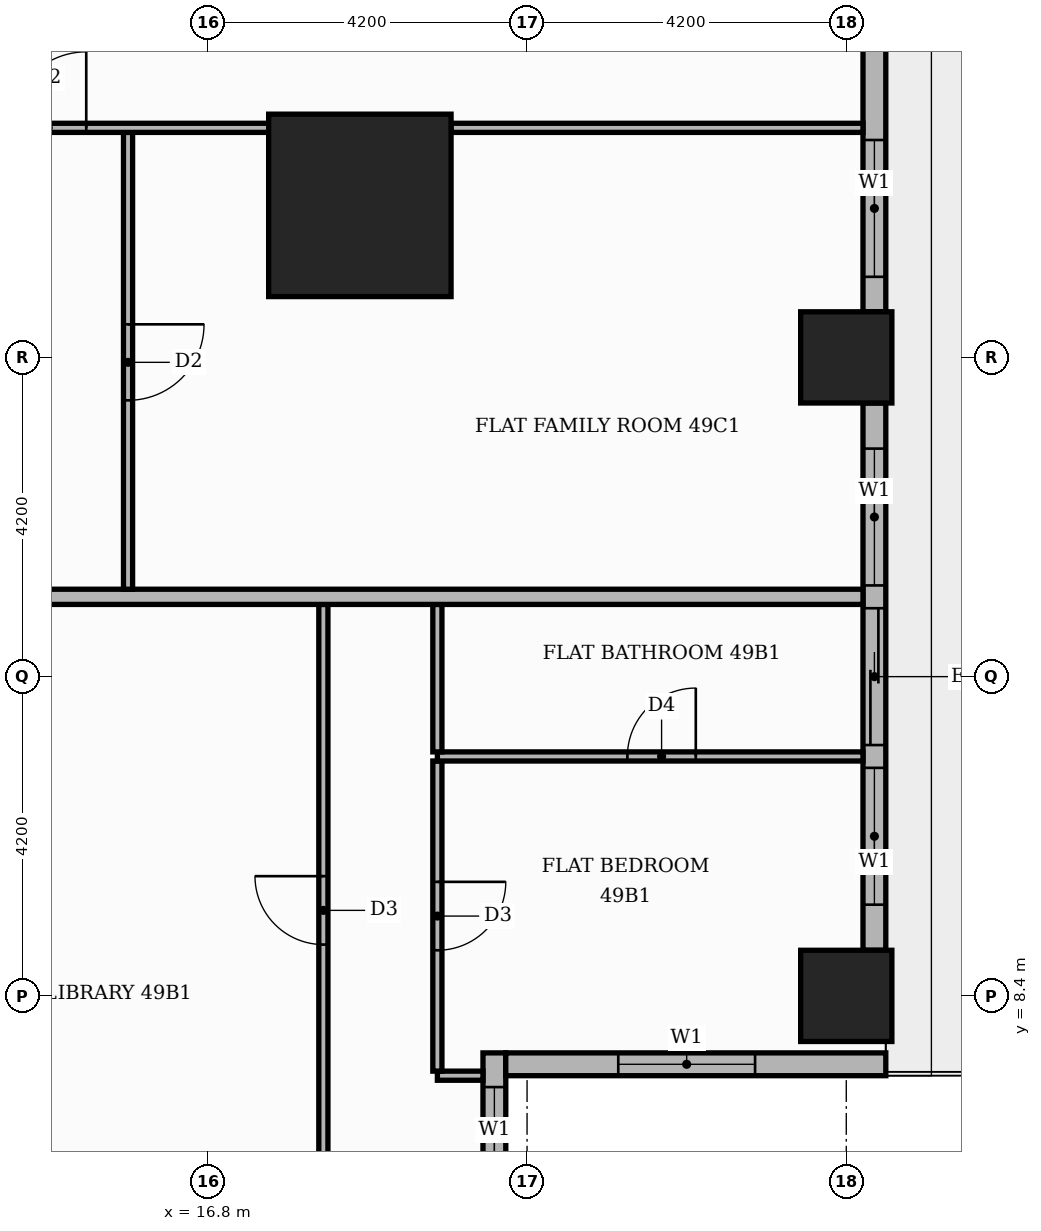
"""IFC4 building model, lengths in metres.
Left out: names, types, materials, properties, quantities, classifications, styles, units other than length and angle.
Written with IfcOpenShell. Run it as: python <this file> out.ifc"""

import sys

from ifc_helpers import new_model, si_unit, direction, frame, frame_2d, origin, origin_2d, place, context, subcontext, project, spatial, rectangle, extrude, element, fill, save


model = new_model("IFC4")
c1 = context("Model", 3, precision=1e-05, world=origin(), true_north=direction((0.0, 1.0)))
c2 = subcontext(c1, "Body", "Model", "MODEL_VIEW")
j1 = project(units=[si_unit("LENGTHUNIT", "METRE"), si_unit("PLANEANGLEUNIT", "RADIAN")], contexts=[c1])
p1 = place(None, origin())
s1 = spatial("IfcSite", under=j1, at=p1, CompositionType="ELEMENT")
p2 = place(p1, origin())
s2 = spatial("IfcBuilding", under=s1, at=p2, CompositionType="ELEMENT")
p3 = place(p2, frame((0.0, 0.0, 207.9)))
s3 = spatial("IfcBuildingStorey", under=s2, at=p3, CompositionType="ELEMENT", Elevation=207.9)
p4 = place(p3, frame((18.8, 18.8, 0.0), z_axis=(0.0, 0.0, 1.0), x_axis=(1.0, 0.0, 0.0)))
e1 = element("IfcColumn", 1, at=p4, inside=s3, PredefinedType="COLUMN", context=c2, shape_type="SweptSolid", body=[
    extrude(rectangle(XDim=2.4, YDim=2.4, at=origin_2d()), origin(), (0.0, 0.0, 1.0), 3.9),
])
for number, where, z_axis, x_axis in (
    (2, (25.2, 8.4, 0.0), (0.0, 0.0, 1.0), (1.0, 0.0, 0.0)),
    (3, (25.2, 16.8, 0.0), (0.0, 0.0, 1.0), (1.0, 0.0, 0.0)),
):
    element("IfcColumn", number, at=place(p3, frame(where, z_axis=z_axis, x_axis=x_axis)), inside=s3, PredefinedType="COLUMN", context=c2, shape_type="SweptSolid", body=[
        extrude(rectangle(XDim=1.2, YDim=1.2, at=origin_2d()), origin(), (0.0, 0.0, 1.0), 3.9),
    ])
p5 = place(p3, frame((20.57, -7.35, 0.0), z_axis=(0.0, 0.0, 1.0), x_axis=(0.0, 1.0, 0.0)))
e4 = element("IfcWall", 4, at=p5, inside=s3, PredefinedType="STANDARD", context=c2, shape_type="SweptSolid", body=[
    extrude(rectangle(XDim=15.0, YDim=0.3, at=frame_2d((7.5, 0.0))), origin(), (0.0, 0.0, 1.0), 3.48),
])
p6 = place(p5, frame((0.15, 0.0, 0.9)))
e5 = element("IfcOpeningElement", 5, at=p6, cuts=e4, PredefinedType="OPENING", context=c2, shape_type="SweptSolid", body=[
    extrude(rectangle(XDim=6.0, YDim=2.1, at=frame_2d((3.0, 1.05))), frame((0.0, 0.16, 0.0), z_axis=(0.0, -1.0, 0.0), x_axis=(1.0, 0.0, 0.0)), (0.0, 0.0, 1.0), 0.32),
])
p7 = place(p5, frame((6.45, 0.0, 0.9)))
e6 = element("IfcOpeningElement", 6, at=p7, cuts=e4, PredefinedType="OPENING", context=c2, shape_type="SweptSolid", body=[
    extrude(rectangle(XDim=6.0, YDim=2.1, at=frame_2d((3.0, 1.05))), frame((0.0, 0.16, 0.0), z_axis=(0.0, -1.0, 0.0), x_axis=(1.0, 0.0, 0.0)), (0.0, 0.0, 1.0), 0.32),
])
p8 = place(p5, frame((12.75, 0.0, 0.9)))
e7 = element("IfcOpeningElement", 7, at=p8, cuts=e4, PredefinedType="OPENING", context=c2, shape_type="SweptSolid", body=[
    extrude(rectangle(XDim=1.8, YDim=2.1, at=frame_2d((0.9, 1.05))), frame((0.0, 0.16, 0.0), z_axis=(0.0, -1.0, 0.0), x_axis=(1.0, 0.0, 0.0)), (0.0, 0.0, 1.0), 0.32),
])
p9 = place(p3, frame((20.72, 7.5, 0.0), z_axis=(0.0, 0.0, 1.0), x_axis=(1.0, 0.0, 0.0)))
e8 = element("IfcWall", 8, at=p9, inside=s3, PredefinedType="STANDARD", context=c2, shape_type="SweptSolid", body=[
    extrude(rectangle(XDim=5.0, YDim=0.3, at=frame_2d((2.5, 0.0))), origin(), (0.0, 0.0, 1.0), 3.48),
])
p10 = place(p9, frame((1.48, 0.0, 0.9)))
e9 = element("IfcOpeningElement", 9, at=p10, cuts=e8, PredefinedType="OPENING", context=c2, shape_type="SweptSolid", body=[
    extrude(rectangle(XDim=1.8, YDim=2.1, at=frame_2d((0.9, 1.05))), frame((0.0, 0.16, 0.0), z_axis=(0.0, -1.0, 0.0), x_axis=(1.0, 0.0, 0.0)), (0.0, 0.0, 1.0), 0.32),
])
p11 = place(p3, frame((25.57, 9.0, 0.0), z_axis=(0.0, 0.0, 1.0), x_axis=(0.0, 1.0, 0.0)))
e10 = element("IfcWall", 10, at=p11, inside=s3, PredefinedType="STANDARD", context=c2, shape_type="SweptSolid", body=[
    extrude(rectangle(XDim=7.2, YDim=0.3, at=frame_2d((3.6, 0.0))), origin(), (0.0, 0.0, 1.0), 3.48),
])
p12 = place(p11, frame((0.6, 0.0, 0.9)))
e11 = element("IfcOpeningElement", 11, at=p12, cuts=e10, PredefinedType="OPENING", context=c2, shape_type="SweptSolid", body=[
    extrude(rectangle(XDim=1.8, YDim=2.1, at=frame_2d((0.9, 1.05))), frame((0.0, 0.16, 0.0), z_axis=(0.0, -1.0, 0.0), x_axis=(1.0, 0.0, 0.0)), (0.0, 0.0, 1.0), 0.32),
])
p13 = place(p11, frame((2.7, 0.0, 0.0)))
e12 = element("IfcOpeningElement", 12, at=p13, cuts=e10, PredefinedType="OPENING", context=c2, shape_type="SweptSolid", body=[
    extrude(rectangle(XDim=1.8, YDim=2.4, at=frame_2d((0.9, 1.2))), frame((0.0, 0.16, 0.0), z_axis=(0.0, -1.0, 0.0), x_axis=(1.0, 0.0, 0.0)), (0.0, 0.0, 1.0), 0.32),
])
p14 = place(p11, frame((4.8, 0.0, 0.9)))
e13 = element("IfcOpeningElement", 13, at=p14, cuts=e10, PredefinedType="OPENING", context=c2, shape_type="SweptSolid", body=[
    extrude(rectangle(XDim=1.8, YDim=2.1, at=frame_2d((0.9, 1.05))), frame((0.0, 0.16, 0.0), z_axis=(0.0, -1.0, 0.0), x_axis=(1.0, 0.0, 0.0)), (0.0, 0.0, 1.0), 0.32),
])
p15 = place(p3, frame((25.57, 17.4, 0.0), z_axis=(0.0, 0.0, 1.0), x_axis=(0.0, 1.0, 0.0)))
e14 = element("IfcWall", 14, at=p15, inside=s3, PredefinedType="STANDARD", context=c2, shape_type="SweptSolid", body=[
    extrude(rectangle(XDim=3.82, YDim=0.3, at=frame_2d((1.91, 0.0))), origin(), (0.0, 0.0, 1.0), 3.48),
])
p16 = place(p15, frame((0.46, 0.0, 0.9)))
e15 = element("IfcOpeningElement", 15, at=p16, cuts=e14, PredefinedType="OPENING", context=c2, shape_type="SweptSolid", body=[
    extrude(rectangle(XDim=1.8, YDim=2.1, at=frame_2d((0.9, 1.05))), frame((0.0, 0.16, 0.0), z_axis=(0.0, -1.0, 0.0), x_axis=(1.0, 0.0, 0.0)), (0.0, 0.0, 1.0), 0.32),
])
p17 = place(p3, frame((18.32, 5.46, 0.0), z_axis=(0.0, 0.0, 1.0), x_axis=(0.0, 1.0, 0.0)))
e16 = element("IfcWall", 16, at=p17, inside=s3, PredefinedType="PARTITIONING", context=c2, shape_type="SweptSolid", body=[
    extrude(rectangle(XDim=8.09, YDim=0.12, at=frame_2d((4.045, 0.0))), origin(), (0.0, 0.0, 1.0), 3.48),
])
p18 = place(p17, frame((3.615, 0.0, 0.0)))
e17 = element("IfcOpeningElement", 17, at=p18, cuts=e16, PredefinedType="OPENING", context=c2, shape_type="SweptSolid", body=[
    extrude(rectangle(XDim=0.9, YDim=2.1, at=frame_2d((0.45, 1.05))), frame((0.0, 0.07, 0.0), z_axis=(0.0, -1.0, 0.0), x_axis=(1.0, 0.0, 0.0)), (0.0, 0.0, 1.0), 0.14),
])
p19 = place(p3, frame((19.82, 7.35, 0.0), z_axis=(0.0, 0.0, 1.0), x_axis=(1.0, 0.0, 0.0)))
e18 = element("IfcWall", 18, at=p19, inside=s3, PredefinedType="PARTITIONING", context=c2, shape_type="SweptSolid", body=[
    extrude(rectangle(XDim=0.6, YDim=0.12, at=frame_2d((0.3, 0.0))), origin(), (0.0, 0.0, 1.0), 3.48),
])
p20 = place(p3, frame((19.82, 7.41, 0.0), z_axis=(0.0, 0.0, 1.0), x_axis=(0.0, 1.0, 0.0)))
e19 = element("IfcWall", 19, at=p20, inside=s3, PredefinedType="PARTITIONING", context=c2, shape_type="SweptSolid", body=[
    extrude(rectangle(XDim=4.08, YDim=0.12, at=frame_2d((2.04, 0.0))), origin(), (0.0, 0.0, 1.0), 3.48),
])
p21 = place(p20, frame((1.59, 0.0, 0.0)))
e20 = element("IfcOpeningElement", 20, at=p21, cuts=e19, PredefinedType="OPENING", context=c2, shape_type="SweptSolid", body=[
    extrude(rectangle(XDim=0.9, YDim=2.1, at=frame_2d((0.45, 1.05))), frame((0.0, 0.07, 0.0), z_axis=(0.0, -1.0, 0.0), x_axis=(1.0, 0.0, 0.0)), (0.0, 0.0, 1.0), 0.14),
])
p22 = place(p3, frame((19.82, 11.55, 0.0), z_axis=(0.0, 0.0, 1.0), x_axis=(1.0, 0.0, 0.0)))
e21 = element("IfcWall", 21, at=p22, inside=s3, PredefinedType="PARTITIONING", context=c2, shape_type="SweptSolid", body=[
    extrude(rectangle(XDim=5.6, YDim=0.12, at=frame_2d((2.8, 0.0))), origin(), (0.0, 0.0, 1.0), 3.48),
])
p23 = place(p22, frame((2.5, 0.0, 0.0)))
e22 = element("IfcOpeningElement", 22, at=p23, cuts=e21, PredefinedType="OPENING", context=c2, shape_type="SweptSolid", body=[
    extrude(rectangle(XDim=0.9, YDim=2.1, at=frame_2d((0.45, 1.05))), frame((0.0, 0.07, 0.0), z_axis=(0.0, -1.0, 0.0), x_axis=(1.0, 0.0, 0.0)), (0.0, 0.0, 1.0), 0.14),
])
p24 = place(p3, frame((19.82, 11.61, 0.0), z_axis=(0.0, 0.0, 1.0), x_axis=(0.0, 1.0, 0.0)))
e23 = element("IfcWall", 23, at=p24, inside=s3, PredefinedType="PARTITIONING", context=c2, shape_type="SweptSolid", body=[
    extrude(rectangle(XDim=1.94, YDim=0.12, at=frame_2d((0.97, 0.0))), origin(), (0.0, 0.0, 1.0), 3.48),
])
p25 = place(p3, frame((-13.65, 13.65, 0.0), z_axis=(0.0, 0.0, 1.0), x_axis=(1.0, 0.0, 0.0)))
e24 = element("IfcWall", 24, at=p25, inside=s3, PredefinedType="PARTITIONING", context=c2, shape_type="SweptSolid", body=[
    extrude(rectangle(XDim=39.07, YDim=0.2, at=frame_2d((19.535, 0.0))), origin(), (0.0, 0.0, 1.0), 3.48),
])
p26 = place(p25, frame((24.65, 0.0, 0.0)))
e25 = element("IfcOpeningElement", 25, at=p26, cuts=e24, PredefinedType="OPENING", context=c2, shape_type="SweptSolid", body=[
    extrude(rectangle(XDim=1.1, YDim=2.4, at=frame_2d((0.55, 1.2))), frame((0.0, 0.11, 0.0), z_axis=(0.0, -1.0, 0.0), x_axis=(1.0, 0.0, 0.0)), (0.0, 0.0, 1.0), 0.22),
])
p27 = place(p25, frame((12.05, 0.0, 0.0)))
e26 = element("IfcOpeningElement", 26, at=p27, cuts=e24, PredefinedType="OPENING", context=c2, shape_type="SweptSolid", body=[
    extrude(rectangle(XDim=1.1, YDim=2.4, at=frame_2d((0.55, 1.2))), frame((0.0, 0.11, 0.0), z_axis=(0.0, -1.0, 0.0), x_axis=(1.0, 0.0, 0.0)), (0.0, 0.0, 1.0), 0.22),
])
p28 = place(p3, frame((15.75, 13.75, 0.0), z_axis=(0.0, 0.0, 1.0), x_axis=(0.0, 1.0, 0.0)))
e27 = element("IfcWall", 27, at=p28, inside=s3, PredefinedType="PARTITIONING", context=c2, shape_type="SweptSolid", body=[
    extrude(rectangle(XDim=6.01, YDim=0.12, at=frame_2d((3.005, 0.0))), origin(), (0.0, 0.0, 1.0), 3.48),
])
p29 = place(p28, frame((2.485, 0.0, 0.0)))
e28 = element("IfcOpeningElement", 28, at=p29, cuts=e27, PredefinedType="OPENING", context=c2, shape_type="SweptSolid", body=[
    extrude(rectangle(XDim=1.0, YDim=2.1, at=frame_2d((0.5, 1.05))), frame((0.0, 0.07, 0.0), z_axis=(0.0, -1.0, 0.0), x_axis=(1.0, 0.0, 0.0)), (0.0, 0.0, 1.0), 0.14),
])
p30 = place(p3, frame((5.35, 19.82, 0.0), z_axis=(0.0, 0.0, 1.0), x_axis=(1.0, 0.0, 0.0)))
e29 = element("IfcWall", 29, at=p30, inside=s3, PredefinedType="PARTITIONING", context=c2, shape_type="SweptSolid", body=[
    extrude(rectangle(XDim=12.25, YDim=0.12, at=frame_2d((6.125, 0.0))), origin(), (0.0, 0.0, 1.0), 3.48),
])
p31 = place(p30, frame((8.85, 0.0, 0.0)))
e30 = element("IfcOpeningElement", 30, at=p31, cuts=e29, PredefinedType="OPENING", context=c2, shape_type="SweptSolid", body=[
    extrude(rectangle(XDim=1.0, YDim=2.1, at=frame_2d((0.5, 1.05))), frame((0.0, 0.07, 0.0), z_axis=(0.0, -1.0, 0.0), x_axis=(1.0, 0.0, 0.0)), (0.0, 0.0, 1.0), 0.14),
])
p32 = place(p30, frame((5.75, 0.0, 0.0)))
e31 = element("IfcOpeningElement", 31, at=p32, cuts=e29, PredefinedType="OPENING", context=c2, shape_type="SweptSolid", body=[
    extrude(rectangle(XDim=0.9, YDim=2.1, at=frame_2d((0.45, 1.05))), frame((0.0, 0.07, 0.0), z_axis=(0.0, -1.0, 0.0), x_axis=(1.0, 0.0, 0.0)), (0.0, 0.0, 1.0), 0.14),
])
p33 = place(p3, frame((20.0, 19.82, 0.0), z_axis=(0.0, 0.0, 1.0), x_axis=(1.0, 0.0, 0.0)))
e32 = element("IfcWall", 32, at=p33, inside=s3, PredefinedType="PARTITIONING", context=c2, shape_type="SweptSolid", body=[
    extrude(rectangle(XDim=5.42, YDim=0.12, at=frame_2d((2.71, 0.0))), origin(), (0.0, 0.0, 1.0), 3.48),
])
p34 = place(p8, origin())
e33 = element("IfcWindow", 33, at=p34, inside=s3, PartitioningType="SINGLE_PANEL", PredefinedType="WINDOW", context=c2, shape_type="SweptSolid", body=[
    extrude(rectangle(XDim=1.8, YDim=2.1, at=frame_2d((0.9, 1.05))), frame((0.0, 0.03, 0.0), z_axis=(0.0, -1.0, 0.0), x_axis=(1.0, 0.0, 0.0)), (0.0, 0.0, 1.0), 0.06),
])
fill(e7, e33)
p35 = place(p10, origin())
e34 = element("IfcWindow", 34, at=p35, inside=s3, PartitioningType="SINGLE_PANEL", PredefinedType="WINDOW", context=c2, shape_type="SweptSolid", body=[
    extrude(rectangle(XDim=1.8, YDim=2.1, at=frame_2d((0.9, 1.05))), frame((0.0, 0.03, 0.0), z_axis=(0.0, -1.0, 0.0), x_axis=(1.0, 0.0, 0.0)), (0.0, 0.0, 1.0), 0.06),
])
fill(e9, e34)
p36 = place(p12, origin())
e35 = element("IfcWindow", 35, at=p36, inside=s3, PartitioningType="SINGLE_PANEL", PredefinedType="WINDOW", context=c2, shape_type="SweptSolid", body=[
    extrude(rectangle(XDim=1.8, YDim=2.1, at=frame_2d((0.9, 1.05))), frame((0.0, 0.03, 0.0), z_axis=(0.0, -1.0, 0.0), x_axis=(1.0, 0.0, 0.0)), (0.0, 0.0, 1.0), 0.06),
])
fill(e11, e35)
p37 = place(p13, origin())
e36 = element("IfcDoor", 36, at=p37, inside=s3, OperationType="SLIDING_TO_RIGHT", PredefinedType="DOOR", context=c2, shape_type="SweptSolid", body=[
    extrude(rectangle(XDim=1.8, YDim=2.4, at=frame_2d((0.9, 1.2))), frame((0.0, 0.025, 0.0), z_axis=(0.0, -1.0, 0.0), x_axis=(1.0, 0.0, 0.0)), (0.0, 0.0, 1.0), 0.05),
])
fill(e12, e36)
p38 = place(p14, origin())
e37 = element("IfcWindow", 37, at=p38, inside=s3, PartitioningType="SINGLE_PANEL", PredefinedType="WINDOW", context=c2, shape_type="SweptSolid", body=[
    extrude(rectangle(XDim=1.8, YDim=2.1, at=frame_2d((0.9, 1.05))), frame((0.0, 0.03, 0.0), z_axis=(0.0, -1.0, 0.0), x_axis=(1.0, 0.0, 0.0)), (0.0, 0.0, 1.0), 0.06),
])
fill(e13, e37)
p39 = place(p16, origin())
e38 = element("IfcWindow", 38, at=p39, inside=s3, PartitioningType="SINGLE_PANEL", PredefinedType="WINDOW", context=c2, shape_type="SweptSolid", body=[
    extrude(rectangle(XDim=1.8, YDim=2.1, at=frame_2d((0.9, 1.05))), frame((0.0, 0.03, 0.0), z_axis=(0.0, -1.0, 0.0), x_axis=(1.0, 0.0, 0.0)), (0.0, 0.0, 1.0), 0.06),
])
fill(e15, e38)
p40 = place(p18, origin())
e39 = element("IfcDoor", 39, at=p40, inside=s3, OperationType="SINGLE_SWING_RIGHT", PredefinedType="DOOR", context=c2, shape_type="SweptSolid", body=[
    extrude(rectangle(XDim=0.9, YDim=2.1, at=frame_2d((0.45, 1.05))), frame((0.0, 0.025, 0.0), z_axis=(0.0, -1.0, 0.0), x_axis=(1.0, 0.0, 0.0)), (0.0, 0.0, 1.0), 0.05),
])
fill(e17, e39)
p41 = place(p21, frame((0.9, 0.0, 0.0), z_axis=(0.0, 0.0, 1.0), x_axis=(-1.0, 0.0, 0.0)))
e40 = element("IfcDoor", 40, at=p41, inside=s3, OperationType="SINGLE_SWING_RIGHT", PredefinedType="DOOR", context=c2, shape_type="SweptSolid", body=[
    extrude(rectangle(XDim=0.9, YDim=2.1, at=frame_2d((0.45, 1.05))), frame((0.0, 0.025, 0.0), z_axis=(0.0, -1.0, 0.0), x_axis=(1.0, 0.0, 0.0)), (0.0, 0.0, 1.0), 0.05),
])
fill(e20, e40)
p42 = place(p23, origin())
e41 = element("IfcDoor", 41, at=p42, inside=s3, OperationType="SINGLE_SWING_RIGHT", PredefinedType="DOOR", context=c2, shape_type="SweptSolid", body=[
    extrude(rectangle(XDim=0.9, YDim=2.1, at=frame_2d((0.45, 1.05))), frame((0.0, 0.025, 0.0), z_axis=(0.0, -1.0, 0.0), x_axis=(1.0, 0.0, 0.0)), (0.0, 0.0, 1.0), 0.05),
])
fill(e22, e41)
p43 = place(p29, frame((1.0, 0.0, 0.0), z_axis=(0.0, 0.0, 1.0), x_axis=(-1.0, 0.0, 0.0)))
e42 = element("IfcDoor", 42, at=p43, inside=s3, OperationType="SINGLE_SWING_RIGHT", PredefinedType="DOOR", context=c2, shape_type="SweptSolid", body=[
    extrude(rectangle(XDim=1.0, YDim=2.1, at=frame_2d((0.5, 1.05))), frame((0.0, 0.025, 0.0), z_axis=(0.0, -1.0, 0.0), x_axis=(1.0, 0.0, 0.0)), (0.0, 0.0, 1.0), 0.05),
])
fill(e28, e42)
p44 = place(p31, origin())
e43 = element("IfcDoor", 43, at=p44, inside=s3, OperationType="SINGLE_SWING_RIGHT", PredefinedType="DOOR", context=c2, shape_type="SweptSolid", body=[
    extrude(rectangle(XDim=1.0, YDim=2.1, at=frame_2d((0.5, 1.05))), frame((0.0, 0.025, 0.0), z_axis=(0.0, -1.0, 0.0), x_axis=(1.0, 0.0, 0.0)), (0.0, 0.0, 1.0), 0.05),
])
fill(e30, e43)
save(model, sys.argv[1])
